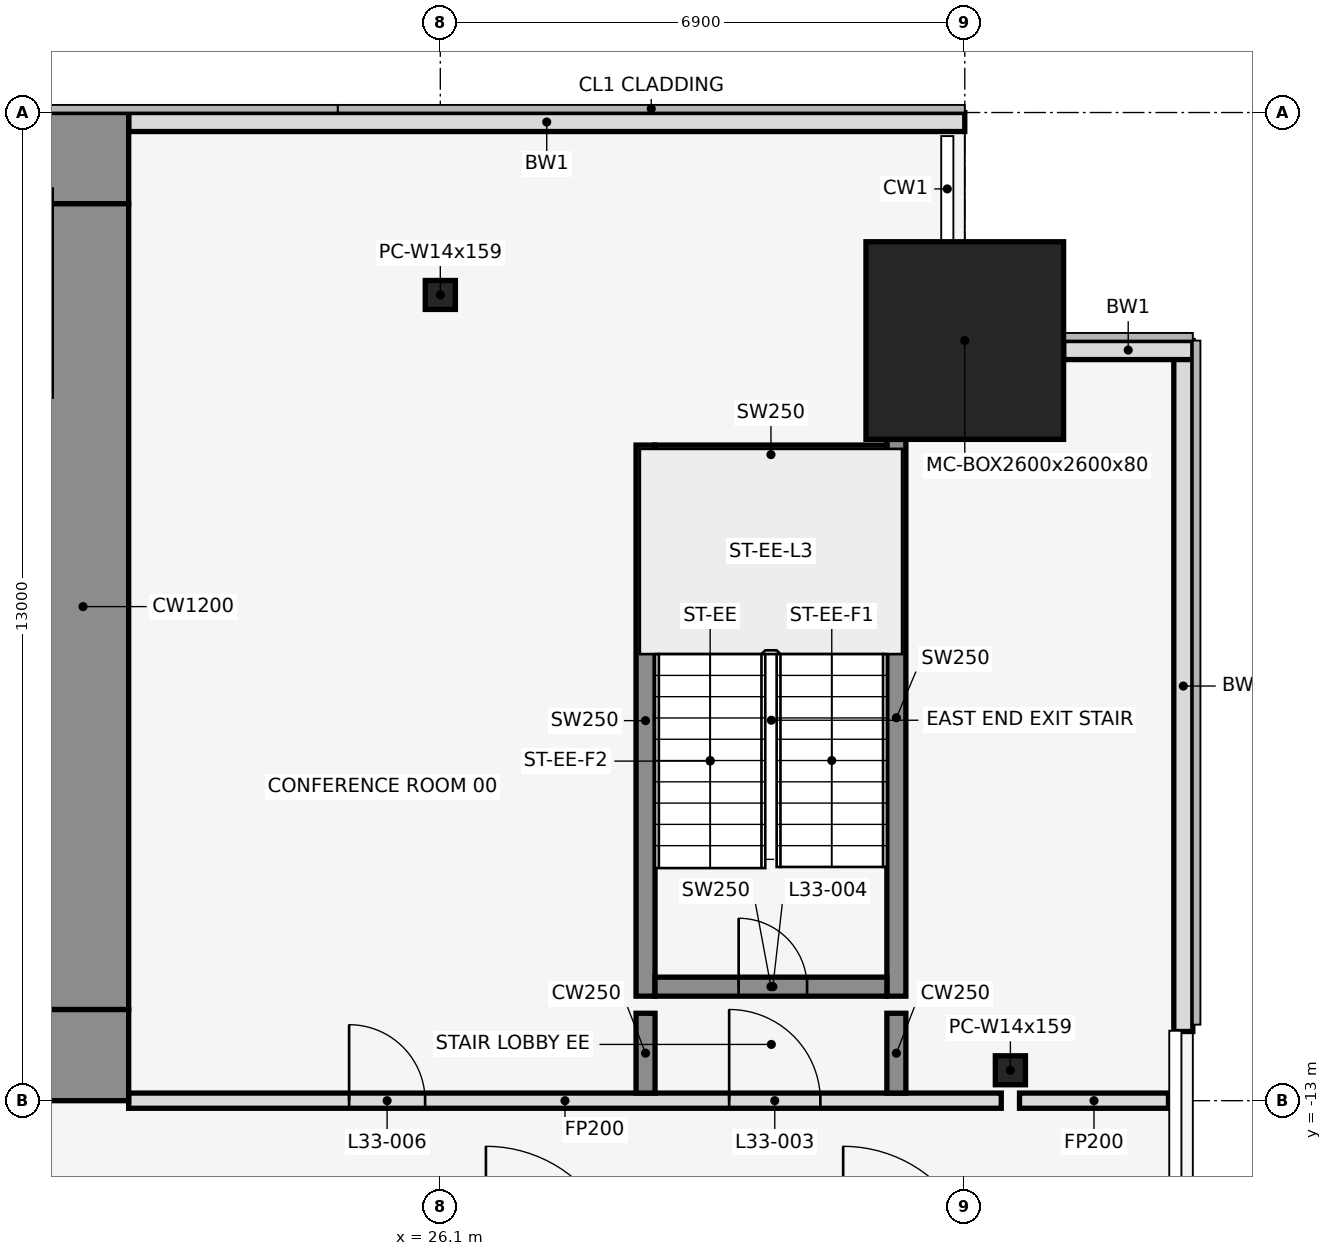
"""IFC4 building model, lengths in metres.
Left out: names, types, materials, properties, quantities, classifications, styles, units other than length and angle.
Written with IfcOpenShell. Run it as: python <this file> out.ifc"""

import sys

from ifc_helpers import new_model, si_unit, direction, frame, frame_2d, origin, origin_2d, place, context, subcontext, project, spatial, rectangle, hollow_rectangle, i_section, extrude, element, fill, save


model = new_model("IFC4")
c1 = context("Model", 3, precision=1e-05, world=origin(), true_north=direction((0.0, 1.0)))
c2 = subcontext(c1, "Body", "Model", "MODEL_VIEW")
j1 = project(units=[si_unit("LENGTHUNIT", "METRE"), si_unit("PLANEANGLEUNIT", "RADIAN")], contexts=[c1])
p1 = place(None, origin())
s1 = spatial("IfcSite", under=j1, at=p1, CompositionType="ELEMENT")
p2 = place(p1, origin())
s2 = spatial("IfcBuilding", under=s1, at=p2, CompositionType="ELEMENT")
p3 = place(p2, frame((0.0, 0.0, 152.7)))
s3 = spatial("IfcBuildingStorey", under=s2, at=p3, CompositionType="ELEMENT", Elevation=152.7)
p4 = place(p3, frame((26.1, -2.4, 0.0), z_axis=(0.0, 0.0, 1.0), x_axis=(1.0, 0.0, 0.0)))
e1 = element("IfcColumn", 1, at=p4, inside=s3, PredefinedType="COLUMN", context=c2, shape_type="SweptSolid", body=[
    extrude(i_section(OverallWidth=0.396, OverallDepth=0.381, WebThickness=0.019, FlangeThickness=0.03, at=origin_2d()), origin(), (0.0, 0.0, 1.0), 4.1),
])
p5 = place(p3, frame((33.0, -3.0, 0.0), z_axis=(0.0, 0.0, 1.0), x_axis=(1.0, 0.0, 0.0)))
e2 = element("IfcColumn", 2, at=p5, inside=s3, PredefinedType="COLUMN", context=c2, shape_type="SweptSolid", body=[
    extrude(hollow_rectangle(XDim=2.6, YDim=2.6, WallThickness=0.08, at=origin_2d()), origin(), (0.0, 0.0, 1.0), 4.1),
])
p6 = place(p3, frame((33.6, -12.6, 0.0), z_axis=(0.0, 0.0, 1.0), x_axis=(1.0, 0.0, 0.0)))
e3 = element("IfcColumn", 3, at=p6, inside=s3, PredefinedType="COLUMN", context=c2, shape_type="SweptSolid", body=[
    extrude(i_section(OverallWidth=0.396, OverallDepth=0.381, WebThickness=0.019, FlangeThickness=0.03, at=origin_2d()), origin(), (0.0, 0.0, 1.0), 4.1),
])
p7 = place(p3, frame((33.0, -0.125, 0.0), z_axis=(0.0, 0.0, 1.0), x_axis=(-1.0, 0.0, 0.0)))
e4 = element("IfcWall", 4, at=p7, inside=s3, PredefinedType="STANDARD", context=c2, shape_type="SweptSolid", body=[
    extrude(rectangle(XDim=11.0, YDim=0.25, at=frame_2d((5.5, 0.0))), origin(), (0.0, 0.0, 1.0), 3.95),
])
p8 = place(p3, frame((35.875, -12.09, 0.0), z_axis=(0.0, 0.0, 1.0), x_axis=(0.0, 1.0, 0.0)))
e5 = element("IfcWall", 5, at=p8, inside=s3, PredefinedType="STANDARD", context=c2, shape_type="SweptSolid", body=[
    extrude(rectangle(XDim=9.09, YDim=0.25, at=frame_2d((4.545, 0.0))), origin(), (0.0, 0.0, 1.0), 3.95),
])
p9 = place(p3, frame((36.0, -3.125, 0.0), z_axis=(0.0, 0.0, 1.0), x_axis=(-1.0, 0.0, 0.0)))
e6 = element("IfcWall", 6, at=p9, inside=s3, PredefinedType="STANDARD", context=c2, shape_type="SweptSolid", body=[
    extrude(rectangle(XDim=1.7, YDim=0.25, at=frame_2d((0.85, 0.0))), origin(), (0.0, 0.0, 1.0), 3.95),
])
p10 = place(p3, frame((28.8, -11.625, 0.0), z_axis=(0.0, 0.0, 1.0), x_axis=(0.0, 1.0, 0.0)))
e7 = element("IfcWall", 7, at=p10, inside=s3, PredefinedType="SHEAR", context=c2, shape_type="SweptSolid", body=[
    extrude(rectangle(XDim=7.25, YDim=0.25, at=frame_2d((3.625, 0.0))), origin(), (0.0, 0.0, 1.0), 4.1),
])
p11 = place(p3, frame((32.1, -11.625, 0.0), z_axis=(0.0, 0.0, 1.0), x_axis=(0.0, 1.0, 0.0)))
e8 = element("IfcWall", 8, at=p11, inside=s3, PredefinedType="SHEAR", context=c2, shape_type="SweptSolid", body=[
    extrude(rectangle(XDim=7.325, YDim=0.25, at=frame_2d((3.663, 0.0))), origin(), (0.0, 0.0, 1.0), 4.1),
])
p12 = place(p3, frame((28.925, -11.5, 0.0), z_axis=(0.0, 0.0, 1.0), x_axis=(1.0, 0.0, 0.0)))
e9 = element("IfcWall", 9, at=p12, inside=s3, PredefinedType="SHEAR", context=c2, shape_type="SweptSolid", body=[
    extrude(rectangle(XDim=3.05, YDim=0.25, at=frame_2d((1.525, 0.0))), origin(), (0.0, 0.0, 1.0), 4.1),
])
p13 = place(p12, frame((1.1, 0.0, 0.0)))
e10 = element("IfcOpeningElement", 10, at=p13, cuts=e9, PredefinedType="OPENING", context=c2, shape_type="SweptSolid", body=[
    extrude(rectangle(XDim=0.9, YDim=2.1, at=frame_2d((0.45, 1.05))), frame((0.0, 0.137, 0.0), z_axis=(0.0, -1.0, 0.0), x_axis=(1.0, 0.0, 0.0)), (0.0, 0.0, 1.0), 0.274),
])
p14 = place(p3, frame((28.925, -4.5, 0.0), z_axis=(0.0, 0.0, 1.0), x_axis=(1.0, 0.0, 0.0)))
e11 = element("IfcWall", 11, at=p14, inside=s3, PredefinedType="SHEAR", context=c2, shape_type="SweptSolid", body=[
    extrude(rectangle(XDim=3.05, YDim=0.25, at=frame_2d((1.525, 0.0))), origin(), (0.0, 0.0, 1.0), 4.1),
])
p15 = place(p3, frame((22.0, -13.0, 0.0), z_axis=(0.0, 0.0, 1.0), x_axis=(1.0, 0.0, 0.0)))
e12 = element("IfcWall", 12, at=p15, inside=s3, PredefinedType="PARTITIONING", context=c2, shape_type="SweptSolid", body=[
    extrude(rectangle(XDim=11.48, YDim=0.2, at=frame_2d((5.74, 0.0))), origin(), (0.0, 0.0, 1.0), 2.84),
])
p16 = place(p15, frame((7.9, 0.0, 0.0)))
e13 = element("IfcOpeningElement", 13, at=p16, cuts=e12, PredefinedType="OPENING", context=c2, shape_type="SweptSolid", body=[
    extrude(rectangle(XDim=1.2, YDim=2.1, at=frame_2d((0.6, 1.05))), frame((0.0, 0.112, 0.0), z_axis=(0.0, -1.0, 0.0), x_axis=(1.0, 0.0, 0.0)), (0.0, 0.0, 1.0), 0.224),
])
p17 = place(p15, frame((2.9, 0.0, 0.0)))
e14 = element("IfcOpeningElement", 14, at=p17, cuts=e12, PredefinedType="OPENING", context=c2, shape_type="SweptSolid", body=[
    extrude(rectangle(XDim=1.0, YDim=2.1, at=frame_2d((0.5, 1.05))), frame((0.0, 0.112, 0.0), z_axis=(0.0, -1.0, 0.0), x_axis=(1.0, 0.0, 0.0)), (0.0, 0.0, 1.0), 0.224),
])
p18 = place(p3, frame((33.72, -13.0, 0.0), z_axis=(0.0, 0.0, 1.0), x_axis=(1.0, 0.0, 0.0)))
e15 = element("IfcWall", 15, at=p18, inside=s3, PredefinedType="PARTITIONING", context=c2, shape_type="SweptSolid", body=[
    extrude(rectangle(XDim=1.96, YDim=0.2, at=frame_2d((0.98, 0.0))), origin(), (0.0, 0.0, 1.0), 2.84),
])
for number, where, z_axis, x_axis in (
    (16, (28.8, -12.9, 0.0), (0.0, 0.0, 1.0), (0.0, 1.0, 0.0)),
    (17, (32.1, -12.9, 0.0), (0.0, 0.0, 1.0), (0.0, 1.0, 0.0)),
):
    element("IfcWall", number, at=place(p3, frame(where, z_axis=z_axis, x_axis=x_axis)), inside=s3, PredefinedType="SHEAR", context=c2, shape_type="SweptSolid", body=[
        extrude(rectangle(XDim=1.05, YDim=0.25, at=frame_2d((0.525, 0.0))), origin(), (0.0, 0.0, 1.0), 4.1),
    ])
p19 = place(p3, frame((-22.0, -0.6, 0.0), z_axis=(0.0, 0.0, 1.0), x_axis=(1.0, 0.0, 0.0)))
e18 = element("IfcWall", 18, at=p19, inside=s3, PredefinedType="SHEAR", context=c2, shape_type="SweptSolid", body=[
    extrude(rectangle(XDim=44.0, YDim=1.2, at=frame_2d((22.0, 0.0))), origin(), (0.0, 0.0, 1.0), 4.1),
])
p20 = place(p19, frame((18.55, 0.0, 0.0)))
e19 = element("IfcOpeningElement", 19, at=p20, cuts=e18, PredefinedType="OPENING", context=c2, shape_type="SweptSolid", body=[
    extrude(rectangle(XDim=0.9, YDim=2.1, at=frame_2d((0.45, 1.05))), frame((0.0, 0.612, 0.0), z_axis=(0.0, -1.0, 0.0), x_axis=(1.0, 0.0, 0.0)), (0.0, 0.0, 1.0), 1.224),
])
p21 = place(p19, frame((24.55, 0.0, 0.0)))
e20 = element("IfcOpeningElement", 20, at=p21, cuts=e18, PredefinedType="OPENING", context=c2, shape_type="SweptSolid", body=[
    extrude(rectangle(XDim=0.9, YDim=2.1, at=frame_2d((0.45, 1.05))), frame((0.0, 0.612, 0.0), z_axis=(0.0, -1.0, 0.0), x_axis=(1.0, 0.0, 0.0)), (0.0, 0.0, 1.0), 1.224),
])
p22 = place(p3, frame((-22.0, -12.4, 0.0), z_axis=(0.0, 0.0, 1.0), x_axis=(1.0, 0.0, 0.0)))
e21 = element("IfcWall", 21, at=p22, inside=s3, PredefinedType="SHEAR", context=c2, shape_type="SweptSolid", body=[
    extrude(rectangle(XDim=44.0, YDim=1.2, at=frame_2d((22.0, 0.0))), origin(), (0.0, 0.0, 1.0), 4.1),
])
p23 = place(p22, frame((2.2, 0.0, 0.0)))
e22 = element("IfcOpeningElement", 22, at=p23, cuts=e21, PredefinedType="OPENING", context=c2, shape_type="SweptSolid", body=[
    extrude(rectangle(XDim=1.2, YDim=2.1, at=frame_2d((0.6, 1.05))), frame((0.0, 0.612, 0.0), z_axis=(0.0, -1.0, 0.0), x_axis=(1.0, 0.0, 0.0)), (0.0, 0.0, 1.0), 1.224),
])
p24 = place(p22, frame((21.4, 0.0, 0.0)))
e23 = element("IfcOpeningElement", 23, at=p24, cuts=e21, PredefinedType="OPENING", context=c2, shape_type="SweptSolid", body=[
    extrude(rectangle(XDim=1.2, YDim=2.1, at=frame_2d((0.6, 1.05))), frame((0.0, 0.612, 0.0), z_axis=(0.0, -1.0, 0.0), x_axis=(1.0, 0.0, 0.0)), (0.0, 0.0, 1.0), 1.224),
])
p25 = place(p22, frame((40.6, 0.0, 0.0)))
e24 = element("IfcOpeningElement", 24, at=p25, cuts=e21, PredefinedType="OPENING", context=c2, shape_type="SweptSolid", body=[
    extrude(rectangle(XDim=1.2, YDim=2.1, at=frame_2d((0.6, 1.05))), frame((0.0, 0.612, 0.0), z_axis=(0.0, -1.0, 0.0), x_axis=(1.0, 0.0, 0.0)), (0.0, 0.0, 1.0), 1.224),
])
p26 = place(p22, frame((16.0, 0.0, 0.0)))
e25 = element("IfcOpeningElement", 25, at=p26, cuts=e21, PredefinedType="OPENING", context=c2, shape_type="SweptSolid", body=[
    extrude(rectangle(XDim=1.8, YDim=2.1, at=frame_2d((0.9, 1.05))), frame((0.0, 0.612, 0.0), z_axis=(0.0, -1.0, 0.0), x_axis=(1.0, 0.0, 0.0)), (0.0, 0.0, 1.0), 1.224),
])
p27 = place(p22, frame((6.3, 0.0, 0.0)))
e26 = element("IfcOpeningElement", 26, at=p27, cuts=e21, PredefinedType="OPENING", context=c2, shape_type="SweptSolid", body=[
    extrude(rectangle(XDim=1.2, YDim=2.1, at=frame_2d((0.6, 1.05))), frame((0.0, 0.612, 0.0), z_axis=(0.0, -1.0, 0.0), x_axis=(1.0, 0.0, 0.0)), (0.0, 0.0, 1.0), 1.224),
])
p28 = place(p22, frame((26.2, 0.0, 0.0)))
e27 = element("IfcOpeningElement", 27, at=p28, cuts=e21, PredefinedType="OPENING", context=c2, shape_type="SweptSolid", body=[
    extrude(rectangle(XDim=1.8, YDim=2.1, at=frame_2d((0.9, 1.05))), frame((0.0, 0.612, 0.0), z_axis=(0.0, -1.0, 0.0), x_axis=(1.0, 0.0, 0.0)), (0.0, 0.0, 1.0), 1.224),
])
p29 = place(p22, frame((36.5, 0.0, 0.0)))
e28 = element("IfcOpeningElement", 28, at=p29, cuts=e21, PredefinedType="OPENING", context=c2, shape_type="SweptSolid", body=[
    extrude(rectangle(XDim=1.2, YDim=2.1, at=frame_2d((0.6, 1.05))), frame((0.0, 0.612, 0.0), z_axis=(0.0, -1.0, 0.0), x_axis=(1.0, 0.0, 0.0)), (0.0, 0.0, 1.0), 1.224),
])
p30 = place(p3, frame((21.4, -11.8, 0.0), z_axis=(0.0, 0.0, 1.0), x_axis=(0.0, 1.0, 0.0)))
e29 = element("IfcWall", 29, at=p30, inside=s3, PredefinedType="SHEAR", context=c2, shape_type="SweptSolid", body=[
    extrude(rectangle(XDim=10.6, YDim=1.2, at=frame_2d((5.3, 0.0))), origin(), (0.0, 0.0, 1.0), 4.1),
])
p31 = place(p16, origin())
e30 = element("IfcDoor", 30, at=p31, inside=s3, OperationType="SINGLE_SWING_RIGHT", PredefinedType="DOOR", context=c2, shape_type="SweptSolid", body=[
    extrude(rectangle(XDim=1.2, YDim=2.1, at=frame_2d((0.6, 1.05))), frame((0.0, 0.025, 0.0), z_axis=(0.0, -1.0, 0.0), x_axis=(1.0, 0.0, 0.0)), (0.0, 0.0, 1.0), 0.05),
])
fill(e13, e30)
p32 = place(p13, origin())
e31 = element("IfcDoor", 31, at=p32, inside=s3, OperationType="SINGLE_SWING_LEFT", PredefinedType="DOOR", context=c2, shape_type="SweptSolid", body=[
    extrude(rectangle(XDim=0.9, YDim=2.1, at=frame_2d((0.45, 1.05))), frame((0.0, 0.025, 0.0), z_axis=(0.0, -1.0, 0.0), x_axis=(1.0, 0.0, 0.0)), (0.0, 0.0, 1.0), 0.05),
])
fill(e10, e31)
p33 = place(p17, origin())
e32 = element("IfcDoor", 32, at=p33, inside=s3, OperationType="SINGLE_SWING_RIGHT", PredefinedType="DOOR", context=c2, shape_type="SweptSolid", body=[
    extrude(rectangle(XDim=1.0, YDim=2.1, at=frame_2d((0.5, 1.05))), frame((0.0, 0.025, 0.0), z_axis=(0.0, -1.0, 0.0), x_axis=(1.0, 0.0, 0.0)), (0.0, 0.0, 1.0), 0.05),
])
fill(e14, e32)
save(model, sys.argv[1])
